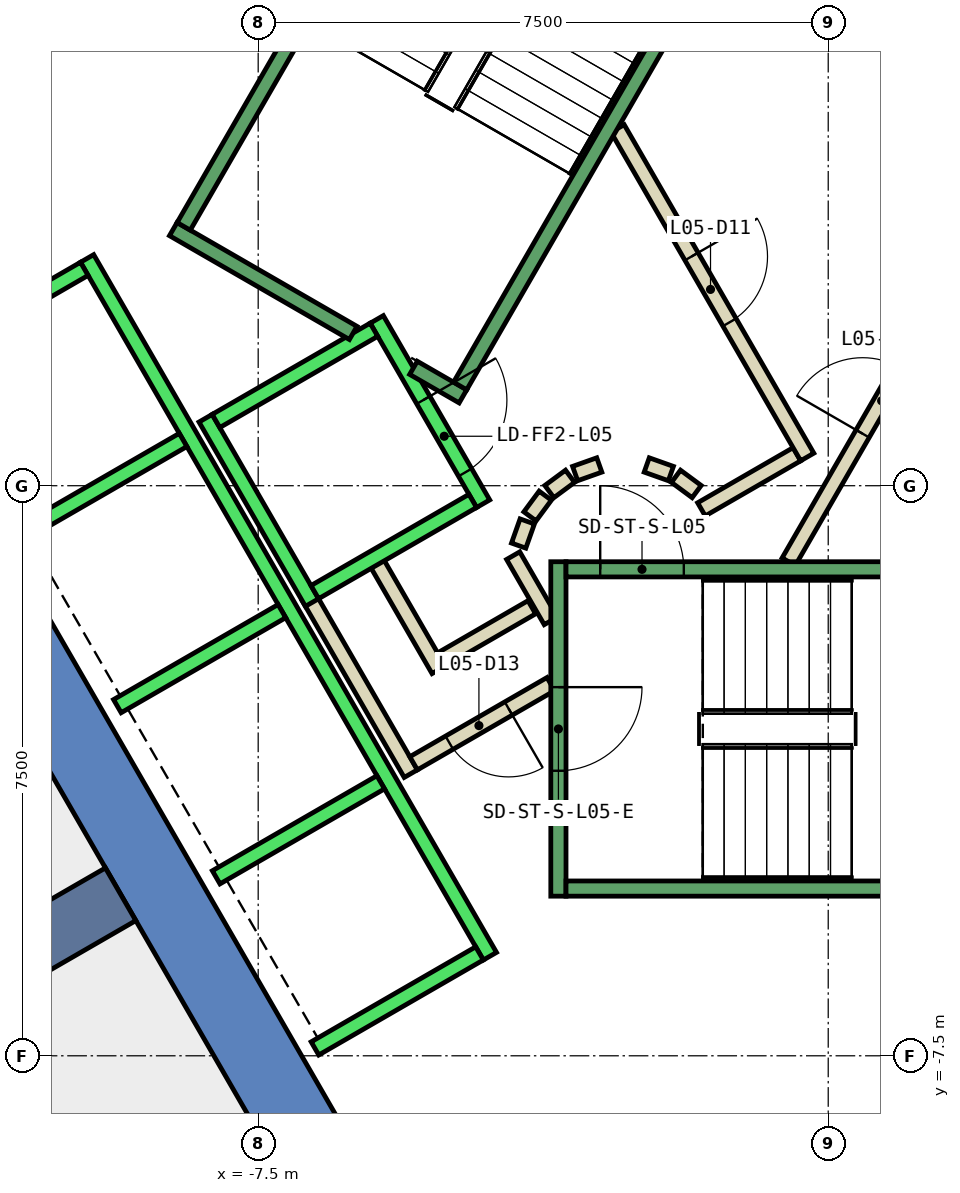
"""IFC4 building model, lengths in metres.
Left out: names, types, materials, properties, quantities, classifications, styles, units other than length and angle.
Written with IfcOpenShell. Run it as: python <this file> out.ifc"""

import sys

from ifc_helpers import new_model, si_unit, direction, frame, frame_2d, origin, place, context, subcontext, project, spatial, polyline, rectangle, outline, extrude, element, fill, save


model = new_model("IFC4")
c1 = context("Model", 3, precision=1e-05, world=origin(), true_north=direction((0.0, 1.0)))
c2 = subcontext(c1, "Body", "Model", "MODEL_VIEW")
j1 = project(units=[si_unit("LENGTHUNIT", "METRE"), si_unit("PLANEANGLEUNIT", "RADIAN")], contexts=[c1])
p1 = place(None, origin())
s1 = spatial("IfcSite", under=j1, at=p1, CompositionType="ELEMENT")
p2 = place(p1, origin())
s2 = spatial("IfcBuilding", under=s1, at=p2, CompositionType="ELEMENT")
p3 = place(p2, frame((0.0, 0.0, 30.0)))
s3 = spatial("IfcBuildingStorey", under=s2, at=p3, CompositionType="ELEMENT", Elevation=30.0)
p4 = place(p3, frame((0.0, 0.0, -0.45)))
e1 = element("IfcWall", 1, at=p4, inside=s3, PredefinedType="SHEAR", context=c2, shape_type="SweptSolid", body=[
    extrude(outline(polyline([(-12.267, 5.252), (-11.402, 4.752), (-6.351, 13.5), (-6.928, 14.5), (-12.267, 5.252)])), origin(), (0.0, 0.0, 1.0), 4.85),
])
p5 = place(p3, frame((0.0, 0.0, -0.45)))
e2 = element("IfcWall", 2, at=p5, inside=s3, PredefinedType="SHEAR", context=c2, shape_type="SweptSolid", body=[
    extrude(outline(polyline([(-13.856, 2.5), (-6.928, -9.5), (-6.351, -8.5), (-12.702, 2.5), (-13.856, 2.5)])), origin(), (0.0, 0.0, 1.0), 4.85),
])
p6 = place(p3, frame((-9.31, -5.375, -0.45), z_axis=(0.0, 0.0, 1.0), x_axis=(-0.866017533419, -0.500013631625, 0.0)))
e3 = element("IfcWall", 3, at=p6, inside=s3, PredefinedType="SHEAR", context=c2, shape_type="SweptSolid", body=[
    extrude(rectangle(XDim=9.0, YDim=0.8, at=frame_2d((4.5, 0.0))), origin(), (0.0, 0.0, 1.0), 4.85),
])
p7 = place(p3, frame((-3.9, -1.599, 0.0), z_axis=(0.0, 0.0, 1.0), x_axis=(-0.865969445389, -0.500096910261, 0.0)))
e4 = element("IfcWall", 4, at=p7, inside=s3, PredefinedType="PARTITIONING", context=c2, shape_type="SweptSolid", body=[
    extrude(rectangle(XDim=1.373, YDim=0.2, at=frame_2d((0.687, 0.0))), origin(), (0.0, 0.0, 1.0), 4.4),
])
p8 = place(p3, frame((-5.126, -2.422, 0.0), z_axis=(0.0, 0.0, 1.0), x_axis=(-0.500062241894, 0.865989465428, 0.0)))
e5 = element("IfcWall", 5, at=p8, inside=s3, PredefinedType="PARTITIONING", context=c2, shape_type="SweptSolid", body=[
    extrude(rectangle(XDim=1.7, YDim=0.2, at=frame_2d((0.85, 0.0))), origin(), (0.0, 0.0, 1.0), 4.4),
])
p9 = place(p3, frame((-5.492, -3.788, 0.0), z_axis=(0.0, 0.0, 1.0), x_axis=(-0.500008949224, 0.866020236886, 0.0)))
e6 = element("IfcWall", 6, at=p9, inside=s3, PredefinedType="PARTITIONING", context=c2, shape_type="SweptSolid", body=[
    extrude(rectangle(XDim=2.68, YDim=0.2, at=frame_2d((1.34, 0.0))), origin(), (0.0, 0.0, 1.0), 4.4),
])
p10 = place(p3, frame((-4.145, -0.92, 0.0), z_axis=(0.0, 0.0, 1.0), x_axis=(0.499743786207, -0.866173278362, 0.0)))
e7 = element("IfcWall", 7, at=p10, inside=s3, PredefinedType="PARTITIONING", context=c2, shape_type="SweptSolid", body=[
    extrude(rectangle(XDim=0.991, YDim=0.2, at=frame_2d((0.495, 0.0))), origin(), (0.0, 0.0, 1.0), 4.4),
])
p11 = place(p3, frame((-3.65, -2.61, 0.0), z_axis=(0.0, 0.0, 1.0), x_axis=(-0.866072462134, -0.499918483688, 0.0)))
e8 = element("IfcWall", 8, at=p11, inside=s3, PredefinedType="PARTITIONING", context=c2, shape_type="SweptSolid", body=[
    extrude(rectangle(XDim=2.084, YDim=0.2, at=frame_2d((1.042, 0.0))), origin(), (0.0, 0.0, 1.0), 4.4),
])
p12 = place(p11, frame((0.642, 0.0, 0.0)))
e9 = element("IfcOpeningElement", 9, at=p12, cuts=e8, PredefinedType="OPENING", context=c2, shape_type="SweptSolid", body=[
    extrude(rectangle(XDim=0.9, YDim=2.1, at=frame_2d((0.45, 1.05))), frame((0.0, 0.11, 0.0), z_axis=(0.0, -1.0, 0.0), x_axis=(1.0, 0.0, 0.0)), (0.0, 0.0, 1.0), 0.22),
])
p13 = place(p3, frame((-0.52, -1.0, 0.0), z_axis=(0.0, 0.0, 1.0), x_axis=(0.50011622646, 0.865958290007, 0.0)))
e10 = element("IfcWall", 10, at=p13, inside=s3, PredefinedType="PARTITIONING", context=c2, shape_type="SweptSolid", body=[
    extrude(rectangle(XDim=4.991, YDim=0.2, at=frame_2d((2.496, 0.0))), origin(), (0.0, 0.0, 1.0), 4.4),
])
p14 = place(p13, frame((1.945, 0.0, 0.0)))
e11 = element("IfcOpeningElement", 11, at=p14, cuts=e10, PredefinedType="OPENING", context=c2, shape_type="SweptSolid", body=[
    extrude(rectangle(XDim=1.0, YDim=2.1, at=frame_2d((0.5, 1.05))), frame((0.0, 0.11, 0.0), z_axis=(0.0, -1.0, 0.0), x_axis=(1.0, 0.0, 0.0)), (0.0, 0.0, 1.0), 0.22),
])
p15 = place(p3, frame((-0.412, 0.414, 0.0), z_axis=(0.0, 0.0, 1.0), x_axis=(-0.866017369001, -0.500013916395, 0.0)))
e12 = element("IfcWall", 12, at=p15, inside=s3, PredefinedType="PARTITIONING", context=c2, shape_type="SweptSolid", body=[
    extrude(rectangle(XDim=1.45, YDim=0.2, at=frame_2d((0.725, 0.0))), origin(), (0.0, 0.0, 1.0), 4.4),
])
p16 = place(p3, frame((-1.731, -0.077, 0.0), z_axis=(0.0, 0.0, 1.0), x_axis=(-0.804311165252, 0.594208338422, 0.0)))
e13 = element("IfcWall", 13, at=p16, inside=s3, PredefinedType="PARTITIONING", context=c2, shape_type="SweptSolid", body=[
    extrude(rectangle(XDim=0.338, YDim=0.2, at=frame_2d((0.169, 0.0))), origin(), (0.0, 0.0, 1.0), 4.4),
])
p17 = place(p3, frame((-2.07, 0.16, 0.0), z_axis=(0.0, 0.0, 1.0), x_axis=(-0.942199461132, 0.335052496547, 0.0)))
e14 = element("IfcWall", 14, at=p17, inside=s3, PredefinedType="PARTITIONING", context=c2, shape_type="SweptSolid", body=[
    extrude(rectangle(XDim=0.337, YDim=0.2, at=frame_2d((0.169, 0.0))), origin(), (0.0, 0.0, 1.0), 4.4),
])
p18 = place(p3, frame((-3.012, 0.273, 0.0), z_axis=(0.0, 0.0, 1.0), x_axis=(-0.942280615813, -0.334824194261, 0.0)))
e15 = element("IfcWall", 15, at=p18, inside=s3, PredefinedType="PARTITIONING", context=c2, shape_type="SweptSolid", body=[
    extrude(rectangle(XDim=0.338, YDim=0.2, at=frame_2d((0.169, 0.0))), origin(), (0.0, 0.0, 1.0), 4.4),
])
p19 = place(p3, frame((-3.397, 0.124, 0.0), z_axis=(0.0, 0.0, 1.0), x_axis=(-0.804311165252, -0.594208338422, 0.0)))
e16 = element("IfcWall", 16, at=p19, inside=s3, PredefinedType="PARTITIONING", context=c2, shape_type="SweptSolid", body=[
    extrude(rectangle(XDim=0.338, YDim=0.2, at=frame_2d((0.169, 0.0))), origin(), (0.0, 0.0, 1.0), 4.4),
])
p20 = place(p3, frame((-3.723, -0.131, 0.0), z_axis=(0.0, 0.0, 1.0), x_axis=(-0.594675113454, -0.803966112121, 0.0)))
e17 = element("IfcWall", 17, at=p20, inside=s3, PredefinedType="PARTITIONING", context=c2, shape_type="SweptSolid", body=[
    extrude(rectangle(XDim=0.338, YDim=0.2, at=frame_2d((0.169, 0.0))), origin(), (0.0, 0.0, 1.0), 4.4),
])
p21 = place(p3, frame((-3.96, -0.47, 0.0), z_axis=(0.0, 0.0, 1.0), x_axis=(-0.334824194261, -0.942280615813, 0.0)))
e18 = element("IfcWall", 18, at=p21, inside=s3, PredefinedType="PARTITIONING", context=c2, shape_type="SweptSolid", body=[
    extrude(rectangle(XDim=0.338, YDim=0.2, at=frame_2d((0.169, 0.0))), origin(), (0.0, 0.0, 1.0), 4.4),
])
p22 = place(p3, frame((-2.771, 4.7, 0.0), z_axis=(0.0, 0.0, 1.0), x_axis=(0.499969479948, -0.866043023828, 0.0)))
e19 = element("IfcWall", 19, at=p22, inside=s3, PredefinedType="PARTITIONING", context=c2, shape_type="SweptSolid", body=[
    extrude(rectangle(XDim=4.99, YDim=0.2, at=frame_2d((2.495, 0.0))), origin(), (0.0, 0.0, 1.0), 4.4),
])
p23 = place(p22, frame((1.945, 0.0, 0.0)))
e20 = element("IfcOpeningElement", 20, at=p23, cuts=e19, PredefinedType="OPENING", context=c2, shape_type="SweptSolid", body=[
    extrude(rectangle(XDim=1.0, YDim=2.1, at=frame_2d((0.5, 1.05))), frame((0.0, 0.11, 0.0), z_axis=(0.0, -1.0, 0.0), x_axis=(1.0, 0.0, 0.0)), (0.0, 0.0, 1.0), 0.22),
])
p24 = place(p3, frame((-5.94, 2.188, 0.0), z_axis=(0.0, 0.0, 1.0), x_axis=(0.49994636267, -0.866056369097, 0.0)))
e21 = element("IfcWall", 21, at=p24, inside=s3, PredefinedType="STANDARD", context=c2, shape_type="SweptSolid", body=[
    extrude(rectangle(XDim=2.8, YDim=0.2, at=frame_2d((1.4, 0.0))), origin(), (0.0, 0.0, 1.0), 4.4),
])
p25 = place(p24, frame((1.225, 0.0, 0.0)))
e22 = element("IfcOpeningElement", 22, at=p25, cuts=e21, PredefinedType="OPENING", context=c2, shape_type="SweptSolid", body=[
    extrude(rectangle(XDim=1.1, YDim=2.1, at=frame_2d((0.55, 1.05))), frame((0.0, 0.11, 0.0), z_axis=(0.0, -1.0, 0.0), x_axis=(1.0, 0.0, 0.0)), (0.0, 0.0, 1.0), 0.22),
])
p26 = place(p3, frame((-8.192, 0.888, 0.0), z_axis=(0.0, 0.0, 1.0), x_axis=(0.49994636267, -0.866056369097, 0.0)))
e23 = element("IfcWall", 23, at=p26, inside=s3, PredefinedType="STANDARD", context=c2, shape_type="SweptSolid", body=[
    extrude(rectangle(XDim=2.8, YDim=0.2, at=frame_2d((1.4, 0.0))), origin(), (0.0, 0.0, 1.0), 4.4),
])
for number, where, z_axis, x_axis in (
    (24, (-5.977, 2.052, 0.0), (0.0, 0.0, 1.0), (-0.866, -0.5, 0.0)),
    (25, (-4.677, -0.2, 0.0), (0.0, 0.0, 1.0), (-0.866, -0.5, 0.0)),
):
    element("IfcWall", number, at=place(p3, frame(where, z_axis=z_axis, x_axis=x_axis)), inside=s3, PredefinedType="STANDARD", context=c2, shape_type="SweptSolid", body=[
        extrude(rectangle(XDim=2.399, YDim=0.2, at=frame_2d((1.2, 0.0))), origin(), (0.0, 0.0, 1.0), 4.4),
    ])
p27 = place(p3, frame((-9.751, 2.99, 0.0), z_axis=(0.0, 0.0, 1.0), x_axis=(0.50000090737, -0.866024879913, 0.0)))
e26 = element("IfcWall", 26, at=p27, inside=s3, PredefinedType="STANDARD", context=c2, shape_type="SweptSolid", body=[
    extrude(rectangle(XDim=10.6, YDim=0.2, at=frame_2d((5.3, 0.0))), origin(), (0.0, 0.0, 1.0), 4.4),
])
p28 = place(p3, frame((-9.788, 2.853, 0.0), z_axis=(0.0, 0.0, 1.0), x_axis=(-0.865998541277, -0.500046524342, 0.0)))
e27 = element("IfcWall", 27, at=p28, inside=s3, PredefinedType="STANDARD", context=c2, shape_type="SweptSolid", body=[
    extrude(rectangle(XDim=2.5, YDim=0.2, at=frame_2d((1.25, 0.0))), origin(), (0.0, 0.0, 1.0), 4.4),
])
for number, where, z_axis, x_axis in (
    (28, (-8.488, 0.602, 0.0), (0.0, 0.0, 1.0), (-0.866, -0.5, 0.0)),
    (29, (-7.188, -1.65, 0.0), (0.0, 0.0, 1.0), (-0.866, -0.5, 0.0)),
    (30, (-5.888, -3.902, 0.0), (0.0, 0.0, 1.0), (-0.866, -0.5, 0.0)),
    (31, (-4.588, -6.153, 0.0), (0.0, 0.0, 1.0), (-0.866, -0.5, 0.0)),
):
    element("IfcWall", number, at=place(p3, frame(where, z_axis=z_axis, x_axis=x_axis)), inside=s3, PredefinedType="STANDARD", context=c2, shape_type="SweptSolid", body=[
        extrude(rectangle(XDim=2.5, YDim=0.2, at=frame_2d((1.25, 0.0))), origin(), (0.0, 0.0, 1.0), 4.4),
    ])
p29 = place(p3, frame((-3.55, -1.0, 0.0), z_axis=(0.0, 0.0, 1.0), x_axis=(0.0, -1.0, 0.0)))
e32 = element("IfcWall", 32, at=p29, inside=s3, PredefinedType="STANDARD", context=c2, shape_type="SweptSolid", body=[
    extrude(rectangle(XDim=4.4, YDim=0.2, at=frame_2d((2.2, 0.0))), origin(), (0.0, 0.0, 1.0), 4.4),
])
p30 = place(p29, frame((1.65, 0.0, 0.0)))
e33 = element("IfcOpeningElement", 33, at=p30, cuts=e32, PredefinedType="OPENING", context=c2, shape_type="SweptSolid", body=[
    extrude(rectangle(XDim=1.1, YDim=2.2, at=frame_2d((0.55, 1.1))), frame((0.0, 0.11, 0.0), z_axis=(0.0, -1.0, 0.0), x_axis=(1.0, 0.0, 0.0)), (0.0, 0.0, 1.0), 0.22),
])
p31 = place(p3, frame((-3.45, -1.1, 0.0), z_axis=(0.0, 0.0, 1.0), x_axis=(1.0, 0.0, 0.0)))
e34 = element("IfcWall", 34, at=p31, inside=s3, PredefinedType="STANDARD", context=c2, shape_type="SweptSolid", body=[
    extrude(rectangle(XDim=6.9, YDim=0.2, at=frame_2d((3.45, 0.0))), origin(), (0.0, 0.0, 1.0), 4.4),
])
p32 = place(p31, frame((0.45, 0.0, 0.0)))
e35 = element("IfcOpeningElement", 35, at=p32, cuts=e34, PredefinedType="OPENING", context=c2, shape_type="SweptSolid", body=[
    extrude(rectangle(XDim=1.1, YDim=2.2, at=frame_2d((0.55, 1.1))), frame((0.0, 0.11, 0.0), z_axis=(0.0, -1.0, 0.0), x_axis=(1.0, 0.0, 0.0)), (0.0, 0.0, 1.0), 0.22),
])
p33 = place(p3, frame((-3.45, -5.3, 0.0), z_axis=(0.0, 0.0, 1.0), x_axis=(1.0, 0.0, 0.0)))
e36 = element("IfcWall", 36, at=p33, inside=s3, PredefinedType="STANDARD", context=c2, shape_type="SweptSolid", body=[
    extrude(rectangle(XDim=6.9, YDim=0.2, at=frame_2d((3.45, 0.0))), origin(), (0.0, 0.0, 1.0), 4.4),
])
p34 = place(p3, frame((-6.25, 2.01, 0.0), z_axis=(0.0, 0.0, 1.0), x_axis=(-0.86611865017, 0.499838457731, 0.0)))
e37 = element("IfcWall", 37, at=p34, inside=s3, PredefinedType="STANDARD", context=c2, shape_type="SweptSolid", body=[
    extrude(rectangle(XDim=2.733, YDim=0.2, at=frame_2d((1.366, 0.0))), origin(), (0.0, 0.0, 1.0), 4.4),
])
p35 = place(p3, frame((-4.806, 1.176, 0.0), z_axis=(0.0, 0.0, 1.0), x_axis=(-0.866558586415, 0.499075361355, 0.0)))
e38 = element("IfcWall", 38, at=p35, inside=s3, PredefinedType="STANDARD", context=c2, shape_type="SweptSolid", body=[
    extrude(rectangle(XDim=0.751, YDim=0.2, at=frame_2d((0.376, 0.0))), origin(), (0.0, 0.0, 1.0), 4.4),
])
p36 = place(p3, frame((-1.393, 7.288, 0.0), z_axis=(0.0, 0.0, 1.0), x_axis=(-0.499963383562, -0.866046543262, 0.0)))
e39 = element("IfcWall", 39, at=p36, inside=s3, PredefinedType="STANDARD", context=c2, shape_type="SweptSolid", body=[
    extrude(rectangle(XDim=6.9, YDim=0.2, at=frame_2d((3.45, 0.0))), origin(), (0.0, 0.0, 1.0), 4.4),
])
p37 = place(p36, frame((0.45, 0.0, 0.0)))
e40 = element("IfcOpeningElement", 40, at=p37, cuts=e39, PredefinedType="OPENING", context=c2, shape_type="SweptSolid", body=[
    extrude(rectangle(XDim=1.1, YDim=2.2, at=frame_2d((0.55, 1.1))), frame((0.0, 0.11, 0.0), z_axis=(0.0, -1.0, 0.0), x_axis=(1.0, 0.0, 0.0)), (0.0, 0.0, 1.0), 0.22),
])
p38 = place(p3, frame((-5.03, 9.388, 0.0), z_axis=(0.0, 0.0, 1.0), x_axis=(-0.499978703459, -0.866037698999, 0.0)))
e41 = element("IfcWall", 41, at=p38, inside=s3, PredefinedType="STANDARD", context=c2, shape_type="SweptSolid", body=[
    extrude(rectangle(XDim=6.9, YDim=0.2, at=frame_2d((3.45, 0.0))), origin(), (0.0, 0.0, 1.0), 4.4),
])
p39 = place(p14, origin())
e42 = element("IfcDoor", 42, at=p39, inside=s3, OperationType="SINGLE_SWING_LEFT", PredefinedType="DOOR", context=c2, shape_type="SweptSolid", body=[
    extrude(rectangle(XDim=1.0, YDim=2.1, at=frame_2d((0.5, 1.05))), frame((0.0, 0.025, 0.0), z_axis=(0.0, -1.0, 0.0), x_axis=(1.0, 0.0, 0.0)), (0.0, 0.0, 1.0), 0.05),
])
fill(e11, e42)
p40 = place(p23, origin())
e43 = element("IfcDoor", 43, at=p40, inside=s3, OperationType="SINGLE_SWING_RIGHT", PredefinedType="DOOR", context=c2, shape_type="SweptSolid", body=[
    extrude(rectangle(XDim=1.0, YDim=2.1, at=frame_2d((0.5, 1.05))), frame((0.0, 0.025, 0.0), z_axis=(0.0, -1.0, 0.0), x_axis=(1.0, 0.0, 0.0)), (0.0, 0.0, 1.0), 0.05),
])
fill(e20, e43)
p41 = place(p12, origin())
e44 = element("IfcDoor", 44, at=p41, inside=s3, OperationType="SINGLE_SWING_LEFT", PredefinedType="DOOR", context=c2, shape_type="SweptSolid", body=[
    extrude(rectangle(XDim=0.9, YDim=2.1, at=frame_2d((0.45, 1.05))), frame((0.0, 0.025, 0.0), z_axis=(0.0, -1.0, 0.0), x_axis=(1.0, 0.0, 0.0)), (0.0, 0.0, 1.0), 0.05),
])
fill(e9, e44)
p42 = place(p25, origin())
e45 = element("IfcDoor", 45, at=p42, inside=s3, OperationType="SLIDING_TO_LEFT", PredefinedType="DOOR", context=c2, shape_type="SweptSolid", body=[
    extrude(rectangle(XDim=1.1, YDim=2.1, at=frame_2d((0.55, 1.05))), frame((0.0, 0.025, 0.0), z_axis=(0.0, -1.0, 0.0), x_axis=(1.0, 0.0, 0.0)), (0.0, 0.0, 1.0), 0.05),
])
fill(e22, e45)
p43 = place(p32, origin())
e46 = element("IfcDoor", 46, at=p43, inside=s3, OperationType="SINGLE_SWING_LEFT", PredefinedType="DOOR", context=c2, shape_type="SweptSolid", body=[
    extrude(rectangle(XDim=1.1, YDim=2.2, at=frame_2d((0.55, 1.1))), frame((0.0, 0.025, 0.0), z_axis=(0.0, -1.0, 0.0), x_axis=(1.0, 0.0, 0.0)), (0.0, 0.0, 1.0), 0.05),
])
fill(e35, e46)
p44 = place(p30, origin())
e47 = element("IfcDoor", 47, at=p44, inside=s3, OperationType="SINGLE_SWING_LEFT", PredefinedType="DOOR", context=c2, shape_type="SweptSolid", body=[
    extrude(rectangle(XDim=1.1, YDim=2.2, at=frame_2d((0.55, 1.1))), frame((0.0, 0.025, 0.0), z_axis=(0.0, -1.0, 0.0), x_axis=(1.0, 0.0, 0.0)), (0.0, 0.0, 1.0), 0.05),
])
fill(e33, e47)
save(model, sys.argv[1])
